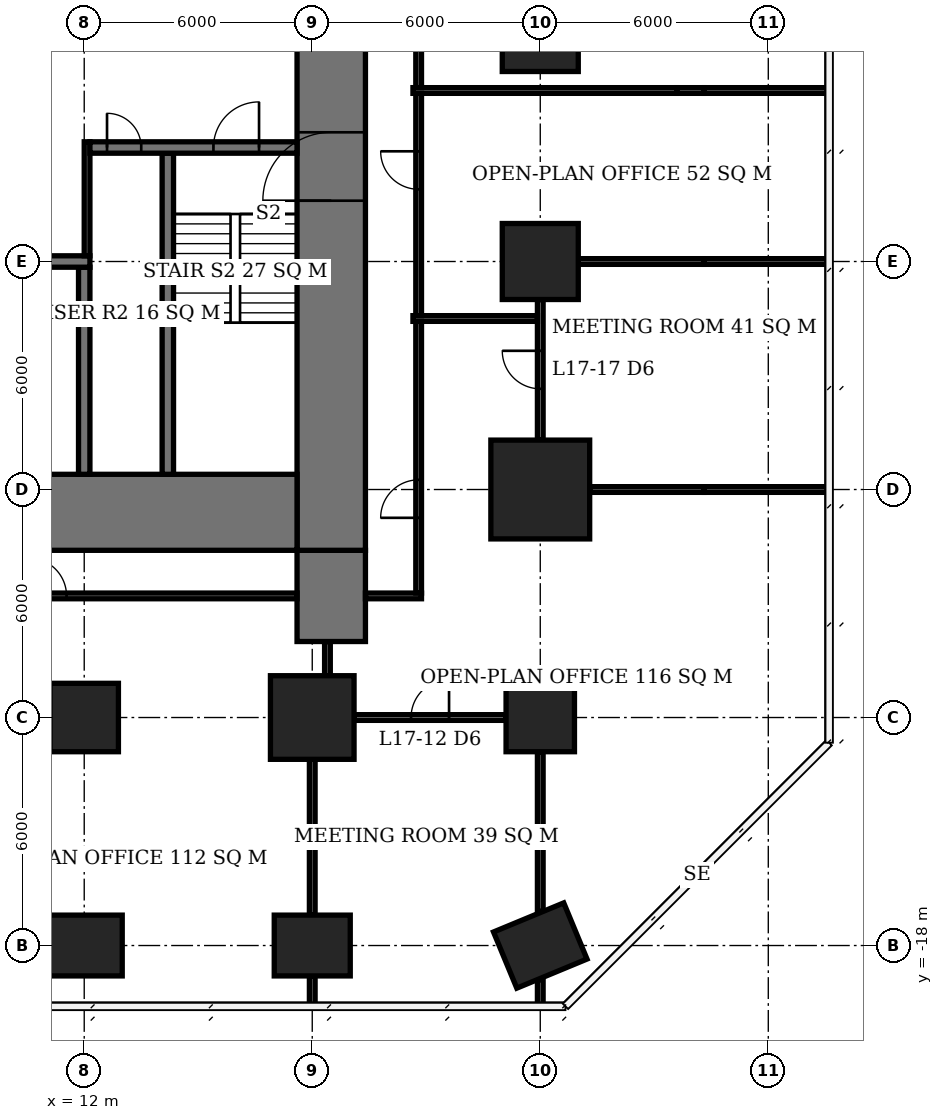
"""IFC4 building model, lengths in metres.
Left out: names, types, materials, properties, quantities, classifications, styles, units other than length and angle.
Written with IfcOpenShell. Run it as: python <this file> out.ifc"""

import sys

from ifc_helpers import new_model, si_unit, direction, frame, frame_2d, origin, origin_2d, place, context, subcontext, project, spatial, rectangle, extrude, element, fill, save


model = new_model("IFC4")
c1 = context("Model", 3, precision=1e-05, world=origin(), true_north=direction((0.0, 1.0)))
c2 = subcontext(c1, "Body", "Model", "MODEL_VIEW")
j1 = project(units=[si_unit("LENGTHUNIT", "METRE"), si_unit("PLANEANGLEUNIT", "RADIAN")], contexts=[c1])
p1 = place(None, origin())
s1 = spatial("IfcSite", under=j1, at=p1, CompositionType="ELEMENT")
p2 = place(p1, origin())
s2 = spatial("IfcBuilding", under=s1, at=p2, CompositionType="ELEMENT")
p3 = place(p2, frame((0.0, 0.0, 72.8)))
s3 = spatial("IfcBuildingStorey", under=s2, at=p3, CompositionType="ELEMENT", Elevation=72.8)
p4 = place(p3, frame((12.0, -18.0, 0.0), z_axis=(0.0, 0.0, 1.0), x_axis=(1.0, 0.0, 0.0)))
e1 = element("IfcColumn", 1, at=p4, inside=s3, PredefinedType="COLUMN", context=c2, shape_type="SweptSolid", body=[
    extrude(rectangle(XDim=2.0, YDim=1.6, at=origin_2d()), origin(), (0.0, 0.0, 1.0), 3.9),
])
p5 = place(p3, frame((12.0, -12.0, 0.0), z_axis=(0.0, 0.0, 1.0), x_axis=(1.0, 0.0, 0.0)))
e2 = element("IfcColumn", 2, at=p5, inside=s3, PredefinedType="COLUMN", context=c2, shape_type="SweptSolid", body=[
    extrude(rectangle(XDim=1.8, YDim=1.8, at=origin_2d()), origin(), (0.0, 0.0, 1.0), 3.9),
])
p6 = place(p3, frame((18.0, -18.0, 0.0), z_axis=(0.0, 0.0, 1.0), x_axis=(1.0, 0.0, 0.0)))
e3 = element("IfcColumn", 3, at=p6, inside=s3, PredefinedType="COLUMN", context=c2, shape_type="SweptSolid", body=[
    extrude(rectangle(XDim=2.0, YDim=1.6, at=origin_2d()), origin(), (0.0, 0.0, 1.0), 3.9),
])
p7 = place(p3, frame((18.0, -12.0, 0.0), z_axis=(0.0, 0.0, 1.0), x_axis=(1.0, 0.0, 0.0)))
e4 = element("IfcColumn", 4, at=p7, inside=s3, PredefinedType="COLUMN", context=c2, shape_type="SweptSolid", body=[
    extrude(rectangle(XDim=2.2, YDim=2.2, at=origin_2d()), origin(), (0.0, 0.0, 1.0), 3.9),
])
p8 = place(p3, frame((24.0, -18.0, 0.0), z_axis=(0.0, 0.0, 1.0), x_axis=(-0.923879532511, -0.382683432365, 0.0)))
e5 = element("IfcColumn", 5, at=p8, inside=s3, PredefinedType="COLUMN", context=c2, shape_type="SweptSolid", body=[
    extrude(rectangle(XDim=2.0, YDim=1.6, at=origin_2d()), origin(), (0.0, 0.0, 1.0), 3.9),
])
p9 = place(p3, frame((24.0, -12.0, 0.0), z_axis=(0.0, 0.0, 1.0), x_axis=(1.0, 0.0, 0.0)))
e6 = element("IfcColumn", 6, at=p9, inside=s3, PredefinedType="COLUMN", context=c2, shape_type="SweptSolid", body=[
    extrude(rectangle(XDim=1.8, YDim=1.8, at=origin_2d()), origin(), (0.0, 0.0, 1.0), 3.9),
])
p10 = place(p3, frame((24.0, -6.0, 0.0), z_axis=(0.0, 0.0, 1.0), x_axis=(1.0, 0.0, 0.0)))
e7 = element("IfcColumn", 7, at=p10, inside=s3, PredefinedType="COLUMN", context=c2, shape_type="SweptSolid", body=[
    extrude(rectangle(XDim=2.6, YDim=2.6, at=origin_2d()), origin(), (0.0, 0.0, 1.0), 3.9),
])
for number, where, z_axis, x_axis in (
    (8, (24.0, 0.0, 0.0), (0.0, 0.0, 1.0), (1.0, 0.0, 0.0)),
    (9, (24.0, 6.0, 0.0), (0.0, 0.0, 1.0), (1.0, 0.0, 0.0)),
):
    element("IfcColumn", number, at=place(p3, frame(where, z_axis=z_axis, x_axis=x_axis)), inside=s3, PredefinedType="COLUMN", context=c2, shape_type="SweptSolid", body=[
        extrude(rectangle(XDim=2.0, YDim=2.0, at=origin_2d()), origin(), (0.0, 0.0, 1.0), 3.9),
    ])
p11 = place(p3, frame((-5.6, -6.6, 0.0), z_axis=(0.0, 0.0, 1.0), x_axis=(1.0, 0.0, 0.0)))
e10 = element("IfcWall", 10, at=p11, inside=s3, PredefinedType="SHEAR", context=c2, shape_type="SweptSolid", body=[
    extrude(rectangle(XDim=23.2, YDim=2.0, at=frame_2d((11.6, 0.0))), origin(), (0.0, 0.0, 1.0), 3.9),
])
p12 = place(p3, frame((18.5, -7.6, 0.0), z_axis=(0.0, 0.0, 1.0), x_axis=(0.0, 1.0, 0.0)))
e11 = element("IfcWall", 11, at=p12, inside=s3, PredefinedType="SHEAR", context=c2, shape_type="SweptSolid", body=[
    extrude(rectangle(XDim=21.2, YDim=1.8, at=frame_2d((10.6, 0.0))), origin(), (0.0, 0.0, 1.0), 3.9),
])
p13 = place(p12, frame((9.2, 0.0, 0.0)))
e12 = element("IfcOpeningElement", 12, at=p13, cuts=e11, PredefinedType="OPENING", context=c2, shape_type="SweptSolid", body=[
    extrude(rectangle(XDim=1.8, YDim=2.4, at=frame_2d((0.9, 1.2))), frame((0.0, 0.91, 0.0), z_axis=(0.0, -1.0, 0.0), x_axis=(1.0, 0.0, 0.0)), (0.0, 0.0, 1.0), 1.82),
])
p14 = place(p3, frame((18.5, -10.0, 0.0), z_axis=(0.0, 0.0, 1.0), x_axis=(0.0, 1.0, 0.0)))
e13 = element("IfcWall", 13, at=p14, inside=s3, PredefinedType="SHEAR", context=c2, shape_type="SweptSolid", body=[
    extrude(rectangle(XDim=2.4, YDim=1.8, at=frame_2d((1.2, 0.0))), origin(), (0.0, 0.0, 1.0), 3.9),
])
p15 = place(p3, frame((-5.6, 0.0, 0.0), z_axis=(0.0, 0.0, 1.0), x_axis=(1.0, 0.0, 0.0)))
e14 = element("IfcWall", 14, at=p15, inside=s3, PredefinedType="SHEAR", context=c2, shape_type="SweptSolid", body=[
    extrude(rectangle(XDim=17.75, YDim=0.3, at=frame_2d((8.875, 0.0))), origin(), (0.0, 0.0, 1.0), 3.9),
])
p16 = place(p15, frame((0.6, 0.0, 0.0)))
e15 = element("IfcOpeningElement", 15, at=p16, cuts=e14, PredefinedType="OPENING", context=c2, shape_type="SweptSolid", body=[
    extrude(rectangle(XDim=0.9, YDim=2.1, at=frame_2d((0.45, 1.05))), frame((0.0, 0.16, 0.0), z_axis=(0.0, -1.0, 0.0), x_axis=(1.0, 0.0, 0.0)), (0.0, 0.0, 1.0), 0.32),
])
p17 = place(p15, frame((3.7, 0.0, 0.0)))
e16 = element("IfcOpeningElement", 16, at=p17, cuts=e14, PredefinedType="OPENING", context=c2, shape_type="SweptSolid", body=[
    extrude(rectangle(XDim=0.9, YDim=2.1, at=frame_2d((0.45, 1.05))), frame((0.0, 0.16, 0.0), z_axis=(0.0, -1.0, 0.0), x_axis=(1.0, 0.0, 0.0)), (0.0, 0.0, 1.0), 0.32),
])
p18 = place(p3, frame((12.15, 3.0, 0.0), z_axis=(0.0, 0.0, 1.0), x_axis=(1.0, 0.0, 0.0)))
e17 = element("IfcWall", 17, at=p18, inside=s3, PredefinedType="SHEAR", context=c2, shape_type="SweptSolid", body=[
    extrude(rectangle(XDim=5.45, YDim=0.3, at=frame_2d((2.725, 0.0))), origin(), (0.0, 0.0, 1.0), 3.9),
])
p19 = place(p18, frame((3.25, 0.0, 0.0)))
e18 = element("IfcOpeningElement", 18, at=p19, cuts=e17, PredefinedType="OPENING", context=c2, shape_type="SweptSolid", body=[
    extrude(rectangle(XDim=1.2, YDim=2.1, at=frame_2d((0.6, 1.05))), frame((0.0, 0.16, 0.0), z_axis=(0.0, -1.0, 0.0), x_axis=(1.0, 0.0, 0.0)), (0.0, 0.0, 1.0), 0.32),
])
p20 = place(p18, frame((0.45, 0.0, 0.0)))
e19 = element("IfcOpeningElement", 19, at=p20, cuts=e17, PredefinedType="OPENING", context=c2, shape_type="SweptSolid", body=[
    extrude(rectangle(XDim=0.9, YDim=2.1, at=frame_2d((0.45, 1.05))), frame((0.0, 0.16, 0.0), z_axis=(0.0, -1.0, 0.0), x_axis=(1.0, 0.0, 0.0)), (0.0, 0.0, 1.0), 0.32),
])
p21 = place(p3, frame((12.0, -5.6, 0.0), z_axis=(0.0, 0.0, 1.0), x_axis=(0.0, 1.0, 0.0)))
e20 = element("IfcWall", 20, at=p21, inside=s3, PredefinedType="SHEAR", context=c2, shape_type="SweptSolid", body=[
    extrude(rectangle(XDim=5.45, YDim=0.3, at=frame_2d((2.725, 0.0))), origin(), (0.0, 0.0, 1.0), 3.9),
])
p22 = place(p3, frame((14.2, -5.6, 0.0), z_axis=(0.0, 0.0, 1.0), x_axis=(0.0, 1.0, 0.0)))
e21 = element("IfcWall", 21, at=p22, inside=s3, PredefinedType="SHEAR", context=c2, shape_type="SweptSolid", body=[
    extrude(rectangle(XDim=8.45, YDim=0.3, at=frame_2d((4.225, 0.0))), origin(), (0.0, 0.0, 1.0), 3.9),
])
p23 = place(p3, frame((19.1, -12.0, 0.0), z_axis=(0.0, 0.0, 1.0), x_axis=(1.0, 0.0, 0.0)))
e22 = element("IfcWall", 22, at=p23, inside=s3, PredefinedType="PARTITIONING", context=c2, shape_type="SweptSolid", body=[
    extrude(rectangle(XDim=4.0, YDim=0.15, at=frame_2d((2.0, 0.0))), origin(), (0.0, 0.0, 1.0), 3.65),
])
p24 = place(p23, frame((1.5, 0.0, 0.0)))
e23 = element("IfcOpeningElement", 23, at=p24, cuts=e22, PredefinedType="OPENING", context=c2, shape_type="SweptSolid", body=[
    extrude(rectangle(XDim=1.0, YDim=2.1, at=frame_2d((0.5, 1.05))), frame((0.0, 0.085, 0.0), z_axis=(0.0, -1.0, 0.0), x_axis=(1.0, 0.0, 0.0)), (0.0, 0.0, 1.0), 0.17),
])
p25 = place(p3, frame((25.3, -6.0, 0.0), z_axis=(0.0, 0.0, 1.0), x_axis=(1.0, 0.0, 0.0)))
e24 = element("IfcWall", 24, at=p25, inside=s3, PredefinedType="PARTITIONING", context=c2, shape_type="SweptSolid", body=[
    extrude(rectangle(XDim=3.01, YDim=0.15, at=frame_2d((1.505, 0.0))), origin(), (0.0, 0.0, 1.0), 2.65),
])
p26 = place(p3, frame((28.31, -6.0, 0.0), z_axis=(0.0, 0.0, 1.0), x_axis=(1.0, 0.0, 0.0)))
e25 = element("IfcWall", 25, at=p26, inside=s3, PredefinedType="PARTITIONING", context=c2, shape_type="SweptSolid", body=[
    extrude(rectangle(XDim=3.29, YDim=0.15, at=frame_2d((1.645, 0.0))), origin(), (0.0, 0.0, 1.0), 3.65),
])
p27 = place(p3, frame((25.0, 0.0, 0.0), z_axis=(0.0, 0.0, 1.0), x_axis=(1.0, 0.0, 0.0)))
e26 = element("IfcWall", 26, at=p27, inside=s3, PredefinedType="PARTITIONING", context=c2, shape_type="SweptSolid", body=[
    extrude(rectangle(XDim=3.31, YDim=0.15, at=frame_2d((1.655, 0.0))), origin(), (0.0, 0.0, 1.0), 2.65),
])
p28 = place(p3, frame((28.31, 0.0, 0.0), z_axis=(0.0, 0.0, 1.0), x_axis=(1.0, 0.0, 0.0)))
e27 = element("IfcWall", 27, at=p28, inside=s3, PredefinedType="PARTITIONING", context=c2, shape_type="SweptSolid", body=[
    extrude(rectangle(XDim=3.29, YDim=0.15, at=frame_2d((1.645, 0.0))), origin(), (0.0, 0.0, 1.0), 3.65),
])
p29 = place(p3, frame((18.0, -19.6, 0.0), z_axis=(0.0, 0.0, 1.0), x_axis=(0.0, 1.0, 0.0)))
e28 = element("IfcWall", 28, at=p29, inside=s3, PredefinedType="PARTITIONING", context=c2, shape_type="SweptSolid", body=[
    extrude(rectangle(XDim=0.8, YDim=0.15, at=frame_2d((0.4, 0.0))), origin(), (0.0, 0.0, 1.0), 3.65),
])
p30 = place(p3, frame((18.0, -17.2, 0.0), z_axis=(0.0, 0.0, 1.0), x_axis=(0.0, 1.0, 0.0)))
e29 = element("IfcWall", 29, at=p30, inside=s3, PredefinedType="PARTITIONING", context=c2, shape_type="SweptSolid", body=[
    extrude(rectangle(XDim=4.1, YDim=0.15, at=frame_2d((2.05, 0.0))), origin(), (0.0, 0.0, 1.0), 3.65),
])
p31 = place(p3, frame((24.0, -19.6, 0.0), z_axis=(0.0, 0.0, 1.0), x_axis=(0.0, 1.0, 0.0)))
e30 = element("IfcWall", 30, at=p31, inside=s3, PredefinedType="PARTITIONING", context=c2, shape_type="SweptSolid", body=[
    extrude(rectangle(XDim=0.703, YDim=0.15, at=frame_2d((0.352, 0.0))), origin(), (0.0, 0.0, 1.0), 3.65),
])
p32 = place(p3, frame((24.0, -17.103, 0.0), z_axis=(0.0, 0.0, 1.0), x_axis=(0.0, 1.0, 0.0)))
e31 = element("IfcWall", 31, at=p32, inside=s3, PredefinedType="PARTITIONING", context=c2, shape_type="SweptSolid", body=[
    extrude(rectangle(XDim=4.203, YDim=0.15, at=frame_2d((2.102, 0.0))), origin(), (0.0, 0.0, 1.0), 3.65),
])
p33 = place(p3, frame((24.0, -4.7, 0.0), z_axis=(0.0, 0.0, 1.0), x_axis=(0.0, 1.0, 0.0)))
e32 = element("IfcWall", 32, at=p33, inside=s3, PredefinedType="PARTITIONING", context=c2, shape_type="SweptSolid", body=[
    extrude(rectangle(XDim=3.7, YDim=0.15, at=frame_2d((1.85, 0.0))), origin(), (0.0, 0.0, 1.0), 3.65),
])
p34 = place(p33, frame((1.35, 0.0, 0.0)))
e33 = element("IfcOpeningElement", 33, at=p34, cuts=e32, PredefinedType="OPENING", context=c2, shape_type="SweptSolid", body=[
    extrude(rectangle(XDim=1.0, YDim=2.1, at=frame_2d((0.5, 1.05))), frame((0.0, 0.085, 0.0), z_axis=(0.0, -1.0, 0.0), x_axis=(1.0, 0.0, 0.0)), (0.0, 0.0, 1.0), 0.17),
])
p35 = place(p3, frame((7.575, -8.8, 0.0), z_axis=(0.0, 0.0, 1.0), x_axis=(1.0, 0.0, 0.0)))
e34 = element("IfcWall", 34, at=p35, inside=s3, PredefinedType="PARTITIONING", context=c2, shape_type="SweptSolid", body=[
    extrude(rectangle(XDim=10.025, YDim=0.15, at=frame_2d((5.013, 0.0))), origin(), (0.0, 0.0, 1.0), 3.65),
])
p36 = place(p35, frame((2.96, 0.0, 0.0)))
e35 = element("IfcOpeningElement", 35, at=p36, cuts=e34, PredefinedType="OPENING", context=c2, shape_type="SweptSolid", body=[
    extrude(rectangle(XDim=1.0, YDim=2.1, at=frame_2d((0.5, 1.05))), frame((0.0, 0.085, 0.0), z_axis=(0.0, -1.0, 0.0), x_axis=(1.0, 0.0, 0.0)), (0.0, 0.0, 1.0), 0.17),
])
p37 = place(p3, frame((18.4, -10.9, 0.0), z_axis=(0.0, 0.0, 1.0), x_axis=(0.0, 1.0, 0.0)))
e36 = element("IfcWall", 36, at=p37, inside=s3, PredefinedType="PARTITIONING", context=c2, shape_type="SweptSolid", body=[
    extrude(rectangle(XDim=0.9, YDim=0.15, at=frame_2d((0.45, 0.0))), origin(), (0.0, 0.0, 1.0), 3.65),
])
p38 = place(p3, frame((19.4, -8.8, 0.0), z_axis=(0.0, 0.0, 1.0), x_axis=(1.0, 0.0, 0.0)))
e37 = element("IfcWall", 37, at=p38, inside=s3, PredefinedType="PARTITIONING", context=c2, shape_type="SweptSolid", body=[
    extrude(rectangle(XDim=1.475, YDim=0.15, at=frame_2d((0.738, 0.0))), origin(), (0.0, 0.0, 1.0), 3.65),
])
p39 = place(p3, frame((20.8, -8.725, 0.0), z_axis=(0.0, 0.0, 1.0), x_axis=(0.0, 1.0, 0.0)))
e38 = element("IfcWall", 38, at=p39, inside=s3, PredefinedType="PARTITIONING", context=c2, shape_type="SweptSolid", body=[
    extrude(rectangle(XDim=7.15, YDim=0.15, at=frame_2d((3.575, 0.0))), origin(), (0.0, 0.0, 1.0), 3.65),
])
p40 = place(p39, frame((1.98, 0.0, 0.0)))
e39 = element("IfcOpeningElement", 39, at=p40, cuts=e38, PredefinedType="OPENING", context=c2, shape_type="SweptSolid", body=[
    extrude(rectangle(XDim=1.0, YDim=2.1, at=frame_2d((0.5, 1.05))), frame((0.0, 0.085, 0.0), z_axis=(0.0, -1.0, 0.0), x_axis=(1.0, 0.0, 0.0)), (0.0, 0.0, 1.0), 0.17),
])
p41 = place(p3, frame((20.8, -1.425, 0.0), z_axis=(0.0, 0.0, 1.0), x_axis=(0.0, 1.0, 0.0)))
e40 = element("IfcWall", 40, at=p41, inside=s3, PredefinedType="PARTITIONING", context=c2, shape_type="SweptSolid", body=[
    extrude(rectangle(XDim=5.85, YDim=0.15, at=frame_2d((2.925, 0.0))), origin(), (0.0, 0.0, 1.0), 3.65),
])
p42 = place(p41, frame((3.325, 0.0, 0.0)))
e41 = element("IfcOpeningElement", 41, at=p42, cuts=e40, PredefinedType="OPENING", context=c2, shape_type="SweptSolid", body=[
    extrude(rectangle(XDim=1.0, YDim=2.1, at=frame_2d((0.5, 1.05))), frame((0.0, 0.085, 0.0), z_axis=(0.0, -1.0, 0.0), x_axis=(1.0, 0.0, 0.0)), (0.0, 0.0, 1.0), 0.17),
])
p43 = place(p3, frame((20.65, -1.5, 0.0), z_axis=(0.0, 0.0, 1.0), x_axis=(1.0, 0.0, 0.0)))
e42 = element("IfcWall", 42, at=p43, inside=s3, PredefinedType="PARTITIONING", context=c2, shape_type="SweptSolid", body=[
    extrude(rectangle(XDim=3.275, YDim=0.15, at=frame_2d((1.638, 0.0))), origin(), (0.0, 0.0, 1.0), 3.65),
])
p44 = place(p3, frame((20.8, 4.575, 0.0), z_axis=(0.0, 0.0, 1.0), x_axis=(0.0, 1.0, 0.0)))
e43 = element("IfcWall", 43, at=p44, inside=s3, PredefinedType="PARTITIONING", context=c2, shape_type="SweptSolid", body=[
    extrude(rectangle(XDim=10.15, YDim=0.15, at=frame_2d((5.075, 0.0))), origin(), (0.0, 0.0, 1.0), 3.65),
])
p45 = place(p44, frame((6.12, 0.0, 0.0)))
e44 = element("IfcOpeningElement", 44, at=p45, cuts=e43, PredefinedType="OPENING", context=c2, shape_type="SweptSolid", body=[
    extrude(rectangle(XDim=1.0, YDim=2.1, at=frame_2d((0.5, 1.05))), frame((0.0, 0.085, 0.0), z_axis=(0.0, -1.0, 0.0), x_axis=(1.0, 0.0, 0.0)), (0.0, 0.0, 1.0), 0.17),
])
p46 = place(p3, frame((20.65, 4.5, 0.0), z_axis=(0.0, 0.0, 1.0), x_axis=(1.0, 0.0, 0.0)))
e45 = element("IfcWall", 45, at=p46, inside=s3, PredefinedType="PARTITIONING", context=c2, shape_type="SweptSolid", body=[
    extrude(rectangle(XDim=6.94, YDim=0.15, at=frame_2d((3.47, 0.0))), origin(), (0.0, 0.0, 1.0), 3.65),
])
p47 = place(p3, frame((27.59, 4.5, 0.0), z_axis=(0.0, 0.0, 1.0), x_axis=(1.0, 0.0, 0.0)))
e46 = element("IfcWall", 46, at=p47, inside=s3, PredefinedType="PARTITIONING", context=c2, shape_type="SweptSolid", body=[
    extrude(rectangle(XDim=0.72, YDim=0.15, at=frame_2d((0.36, 0.0))), origin(), (0.0, 0.0, 1.0), 2.65),
])
p48 = place(p3, frame((28.31, 4.5, 0.0), z_axis=(0.0, 0.0, 1.0), x_axis=(1.0, 0.0, 0.0)))
e47 = element("IfcWall", 47, at=p48, inside=s3, PredefinedType="PARTITIONING", context=c2, shape_type="SweptSolid", body=[
    extrude(rectangle(XDim=3.29, YDim=0.15, at=frame_2d((1.645, 0.0))), origin(), (0.0, 0.0, 1.0), 3.65),
])
p49 = place(p3, frame((12.075, 0.15, 0.0), z_axis=(0.0, 0.0, 1.0), x_axis=(0.0, 1.0, 0.0)))
e48 = element("IfcWall", 48, at=p49, inside=s3, PredefinedType="PARTITIONING", context=c2, shape_type="SweptSolid", body=[
    extrude(rectangle(XDim=3.0, YDim=0.15, at=frame_2d((1.5, 0.0))), origin(), (0.0, 0.0, 1.0), 3.65),
])
p50 = place(p13, origin())
e49 = element("IfcDoor", 49, at=p50, inside=s3, OperationType="DOUBLE_DOOR_SINGLE_SWING", PredefinedType="DOOR", context=c2, shape_type="SweptSolid", body=[
    extrude(rectangle(XDim=1.8, YDim=2.4, at=frame_2d((0.9, 1.2))), frame((0.0, 0.025, 0.0), z_axis=(0.0, -1.0, 0.0), x_axis=(1.0, 0.0, 0.0)), (0.0, 0.0, 1.0), 0.05),
])
fill(e12, e49)
p51 = place(p19, origin())
e50 = element("IfcDoor", 50, at=p51, inside=s3, OperationType="SINGLE_SWING_RIGHT", PredefinedType="DOOR", context=c2, shape_type="SweptSolid", body=[
    extrude(rectangle(XDim=1.2, YDim=2.1, at=frame_2d((0.6, 1.05))), frame((0.0, 0.025, 0.0), z_axis=(0.0, -1.0, 0.0), x_axis=(1.0, 0.0, 0.0)), (0.0, 0.0, 1.0), 0.05),
])
fill(e18, e50)
p52 = place(p20, origin())
e51 = element("IfcDoor", 51, at=p52, inside=s3, OperationType="SINGLE_SWING_LEFT", PredefinedType="DOOR", context=c2, shape_type="SweptSolid", body=[
    extrude(rectangle(XDim=0.9, YDim=2.1, at=frame_2d((0.45, 1.05))), frame((0.0, 0.025, 0.0), z_axis=(0.0, -1.0, 0.0), x_axis=(1.0, 0.0, 0.0)), (0.0, 0.0, 1.0), 0.05),
])
fill(e19, e51)
p53 = place(p24, origin())
e52 = element("IfcDoor", 52, at=p53, inside=s3, OperationType="SINGLE_SWING_RIGHT", PredefinedType="DOOR", context=c2, shape_type="SweptSolid", body=[
    extrude(rectangle(XDim=1.0, YDim=2.1, at=frame_2d((0.5, 1.05))), frame((0.0, 0.025, 0.0), z_axis=(0.0, -1.0, 0.0), x_axis=(1.0, 0.0, 0.0)), (0.0, 0.0, 1.0), 0.05),
])
fill(e23, e52)
p54 = place(p34, origin())
e53 = element("IfcDoor", 53, at=p54, inside=s3, OperationType="SINGLE_SWING_RIGHT", PredefinedType="DOOR", context=c2, shape_type="SweptSolid", body=[
    extrude(rectangle(XDim=1.0, YDim=2.1, at=frame_2d((0.5, 1.05))), frame((0.0, 0.025, 0.0), z_axis=(0.0, -1.0, 0.0), x_axis=(1.0, 0.0, 0.0)), (0.0, 0.0, 1.0), 0.05),
])
fill(e33, e53)
p55 = place(p36, origin())
e54 = element("IfcDoor", 54, at=p55, inside=s3, OperationType="SINGLE_SWING_LEFT", PredefinedType="DOOR", context=c2, shape_type="SweptSolid", body=[
    extrude(rectangle(XDim=1.0, YDim=2.1, at=frame_2d((0.5, 1.05))), frame((0.0, 0.025, 0.0), z_axis=(0.0, -1.0, 0.0), x_axis=(1.0, 0.0, 0.0)), (0.0, 0.0, 1.0), 0.05),
])
fill(e35, e54)
p56 = place(p40, origin())
e55 = element("IfcDoor", 55, at=p56, inside=s3, OperationType="SINGLE_SWING_LEFT", PredefinedType="DOOR", context=c2, shape_type="SweptSolid", body=[
    extrude(rectangle(XDim=1.0, YDim=2.1, at=frame_2d((0.5, 1.05))), frame((0.0, 0.025, 0.0), z_axis=(0.0, -1.0, 0.0), x_axis=(1.0, 0.0, 0.0)), (0.0, 0.0, 1.0), 0.05),
])
fill(e39, e55)
p57 = place(p42, origin())
e56 = element("IfcDoor", 56, at=p57, inside=s3, OperationType="SINGLE_SWING_RIGHT", PredefinedType="DOOR", context=c2, shape_type="SweptSolid", body=[
    extrude(rectangle(XDim=1.0, YDim=2.1, at=frame_2d((0.5, 1.05))), frame((0.0, 0.025, 0.0), z_axis=(0.0, -1.0, 0.0), x_axis=(1.0, 0.0, 0.0)), (0.0, 0.0, 1.0), 0.05),
])
fill(e41, e56)
save(model, sys.argv[1])
